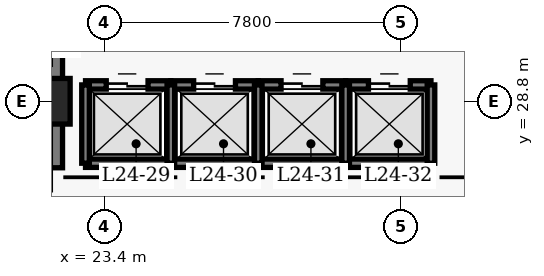
"""IFC4 building model, lengths in metres.
Left out: names, types, materials, properties, quantities, classifications, styles, units other than length and angle.
Written with IfcOpenShell. Run it as: python <this file> out.ifc"""

import sys

from ifc_helpers import new_model, si_unit, direction, frame, frame_2d, origin, origin_2d, place, context, subcontext, project, spatial, rectangle, extrude, element, fill, save


model = new_model("IFC4")
c1 = context("Model", 3, precision=1e-05, world=origin(), true_north=direction((0.0, 1.0)))
c2 = subcontext(c1, "Body", "Model", "MODEL_VIEW")
j1 = project(units=[si_unit("LENGTHUNIT", "METRE"), si_unit("PLANEANGLEUNIT", "RADIAN")], contexts=[c1])
p1 = place(None, origin())
s1 = spatial("IfcSite", under=j1, at=p1, CompositionType="ELEMENT")
p2 = place(p1, origin())
s2 = spatial("IfcBuilding", under=s1, at=p2, CompositionType="ELEMENT")
p3 = place(p2, frame((0.0, 0.0, 99.4)))
s3 = spatial("IfcBuildingStorey", under=s2, at=p3, CompositionType="ELEMENT", Elevation=99.4)
p4 = place(p3, frame((21.9, 27.05, 0.0), z_axis=(0.0, 0.0, 1.0), x_axis=(0.0, 1.0, 0.0)))
e1 = element("IfcWall", 1, at=p4, inside=s3, PredefinedType="SHEAR", context=c2, shape_type="SweptSolid", body=[
    extrude(rectangle(XDim=13.67, YDim=0.8, at=frame_2d((6.835, 0.0))), origin(), (0.0, 0.0, 1.0), 3.8),
])
p5 = place(p3, frame((21.9, 28.8, 0.0), z_axis=(0.0, 0.0, 1.0), x_axis=(1.0, 0.0, 0.0)))
e2 = element("IfcColumn", 2, at=p5, inside=s3, PredefinedType="COLUMN", context=c2, shape_type="SweptSolid", body=[
    extrude(rectangle(XDim=1.2, YDim=1.2, at=origin_2d()), origin(), (0.0, 0.0, 1.0), 3.8),
])
p6 = place(p3, frame((22.905, 29.23, 0.0), z_axis=(0.0, 0.0, 1.0), x_axis=(1.0, 0.0, 0.0)))
e3 = element("IfcWall", 3, at=p6, inside=s3, PredefinedType="SHEAR", context=c2, shape_type="SweptSolid", body=[
    extrude(rectangle(XDim=2.245, YDim=0.22, at=frame_2d((1.123, 0.0))), origin(), (0.0, 0.0, 1.0), 3.8),
])
p7 = place(p6, frame((0.545, 0.0, 0.0)))
e4 = element("IfcOpeningElement", 4, at=p7, cuts=e3, PredefinedType="OPENING", context=c2, shape_type="SweptSolid", body=[
    extrude(rectangle(XDim=1.1, YDim=2.15, at=frame_2d((0.55, 1.075))), frame((0.0, 0.12, 0.0), z_axis=(0.0, -1.0, 0.0), x_axis=(1.0, 0.0, 0.0)), (0.0, 0.0, 1.0), 0.24),
])
p8 = place(p3, frame((22.905, 27.17, 0.0), z_axis=(0.0, 0.0, 1.0), x_axis=(1.0, 0.0, 0.0)))
e5 = element("IfcWall", 5, at=p8, inside=s3, PredefinedType="SHEAR", context=c2, shape_type="SweptSolid", body=[
    extrude(rectangle(XDim=2.245, YDim=0.22, at=frame_2d((1.123, 0.0))), origin(), (0.0, 0.0, 1.0), 3.8),
])
p9 = place(p3, frame((22.905, 27.17, 0.0), z_axis=(0.0, 0.0, 1.0), x_axis=(0.0, 1.0, 0.0)))
e6 = element("IfcWall", 6, at=p9, inside=s3, PredefinedType="SHEAR", context=c2, shape_type="SweptSolid", body=[
    extrude(rectangle(XDim=2.06, YDim=0.2, at=frame_2d((1.03, 0.0))), origin(), (0.0, 0.0, 1.0), 3.8),
])
p10 = place(p3, frame((25.15, 29.23, 0.0), z_axis=(0.0, 0.0, 1.0), x_axis=(1.0, 0.0, 0.0)))
e7 = element("IfcWall", 7, at=p10, inside=s3, PredefinedType="SHEAR", context=c2, shape_type="SweptSolid", body=[
    extrude(rectangle(XDim=2.3, YDim=0.22, at=frame_2d((1.15, 0.0))), origin(), (0.0, 0.0, 1.0), 3.8),
])
p11 = place(p10, frame((0.6, 0.0, 0.0)))
e8 = element("IfcOpeningElement", 8, at=p11, cuts=e7, PredefinedType="OPENING", context=c2, shape_type="SweptSolid", body=[
    extrude(rectangle(XDim=1.1, YDim=2.15, at=frame_2d((0.55, 1.075))), frame((0.0, 0.12, 0.0), z_axis=(0.0, -1.0, 0.0), x_axis=(1.0, 0.0, 0.0)), (0.0, 0.0, 1.0), 0.24),
])
p12 = place(p3, frame((25.15, 27.17, 0.0), z_axis=(0.0, 0.0, 1.0), x_axis=(1.0, 0.0, 0.0)))
e9 = element("IfcWall", 9, at=p12, inside=s3, PredefinedType="SHEAR", context=c2, shape_type="SweptSolid", body=[
    extrude(rectangle(XDim=2.3, YDim=0.22, at=frame_2d((1.15, 0.0))), origin(), (0.0, 0.0, 1.0), 3.8),
])
p13 = place(p3, frame((25.15, 27.17, 0.0), z_axis=(0.0, 0.0, 1.0), x_axis=(0.0, 1.0, 0.0)))
e10 = element("IfcWall", 10, at=p13, inside=s3, PredefinedType="SHEAR", context=c2, shape_type="SweptSolid", body=[
    extrude(rectangle(XDim=2.06, YDim=0.2, at=frame_2d((1.03, 0.0))), origin(), (0.0, 0.0, 1.0), 3.8),
])
p14 = place(p3, frame((27.45, 29.23, 0.0), z_axis=(0.0, 0.0, 1.0), x_axis=(1.0, 0.0, 0.0)))
e11 = element("IfcWall", 11, at=p14, inside=s3, PredefinedType="SHEAR", context=c2, shape_type="SweptSolid", body=[
    extrude(rectangle(XDim=2.3, YDim=0.22, at=frame_2d((1.15, 0.0))), origin(), (0.0, 0.0, 1.0), 3.8),
])
p15 = place(p14, frame((0.6, 0.0, 0.0)))
e12 = element("IfcOpeningElement", 12, at=p15, cuts=e11, PredefinedType="OPENING", context=c2, shape_type="SweptSolid", body=[
    extrude(rectangle(XDim=1.1, YDim=2.15, at=frame_2d((0.55, 1.075))), frame((0.0, 0.12, 0.0), z_axis=(0.0, -1.0, 0.0), x_axis=(1.0, 0.0, 0.0)), (0.0, 0.0, 1.0), 0.24),
])
p16 = place(p3, frame((27.45, 27.17, 0.0), z_axis=(0.0, 0.0, 1.0), x_axis=(1.0, 0.0, 0.0)))
e13 = element("IfcWall", 13, at=p16, inside=s3, PredefinedType="SHEAR", context=c2, shape_type="SweptSolid", body=[
    extrude(rectangle(XDim=2.3, YDim=0.22, at=frame_2d((1.15, 0.0))), origin(), (0.0, 0.0, 1.0), 3.8),
])
p17 = place(p3, frame((27.45, 27.17, 0.0), z_axis=(0.0, 0.0, 1.0), x_axis=(0.0, 1.0, 0.0)))
e14 = element("IfcWall", 14, at=p17, inside=s3, PredefinedType="SHEAR", context=c2, shape_type="SweptSolid", body=[
    extrude(rectangle(XDim=2.06, YDim=0.2, at=frame_2d((1.03, 0.0))), origin(), (0.0, 0.0, 1.0), 3.8),
])
p18 = place(p3, frame((29.75, 29.23, 0.0), z_axis=(0.0, 0.0, 1.0), x_axis=(1.0, 0.0, 0.0)))
e15 = element("IfcWall", 15, at=p18, inside=s3, PredefinedType="SHEAR", context=c2, shape_type="SweptSolid", body=[
    extrude(rectangle(XDim=2.245, YDim=0.22, at=frame_2d((1.123, 0.0))), origin(), (0.0, 0.0, 1.0), 3.8),
])
p19 = place(p18, frame((0.6, 0.0, 0.0)))
e16 = element("IfcOpeningElement", 16, at=p19, cuts=e15, PredefinedType="OPENING", context=c2, shape_type="SweptSolid", body=[
    extrude(rectangle(XDim=1.1, YDim=2.15, at=frame_2d((0.55, 1.075))), frame((0.0, 0.12, 0.0), z_axis=(0.0, -1.0, 0.0), x_axis=(1.0, 0.0, 0.0)), (0.0, 0.0, 1.0), 0.24),
])
p20 = place(p3, frame((29.75, 27.17, 0.0), z_axis=(0.0, 0.0, 1.0), x_axis=(1.0, 0.0, 0.0)))
e17 = element("IfcWall", 17, at=p20, inside=s3, PredefinedType="SHEAR", context=c2, shape_type="SweptSolid", body=[
    extrude(rectangle(XDim=2.245, YDim=0.22, at=frame_2d((1.123, 0.0))), origin(), (0.0, 0.0, 1.0), 3.8),
])
for number, where, z_axis, x_axis in (
    (18, (29.75, 27.17, 0.0), (0.0, 0.0, 1.0), (0.0, 1.0, 0.0)),
    (19, (31.995, 27.17, 0.0), (0.0, 0.0, 1.0), (0.0, 1.0, 0.0)),
):
    element("IfcWall", number, at=place(p3, frame(where, z_axis=z_axis, x_axis=x_axis)), inside=s3, PredefinedType="SHEAR", context=c2, shape_type="SweptSolid", body=[
        extrude(rectangle(XDim=2.06, YDim=0.2, at=frame_2d((1.03, 0.0))), origin(), (0.0, 0.0, 1.0), 3.8),
    ])
p21 = place(p7, origin())
e20 = element("IfcDoor", 20, at=p21, inside=s3, OperationType="DOUBLE_DOOR_SLIDING", PredefinedType="DOOR", context=c2, shape_type="SweptSolid", body=[
    extrude(rectangle(XDim=1.1, YDim=2.15, at=frame_2d((0.55, 1.075))), frame((0.0, 0.025, 0.0), z_axis=(0.0, -1.0, 0.0), x_axis=(1.0, 0.0, 0.0)), (0.0, 0.0, 1.0), 0.05),
])
fill(e4, e20)
p22 = place(p11, origin())
e21 = element("IfcDoor", 21, at=p22, inside=s3, OperationType="DOUBLE_DOOR_SLIDING", PredefinedType="DOOR", context=c2, shape_type="SweptSolid", body=[
    extrude(rectangle(XDim=1.1, YDim=2.15, at=frame_2d((0.55, 1.075))), frame((0.0, 0.025, 0.0), z_axis=(0.0, -1.0, 0.0), x_axis=(1.0, 0.0, 0.0)), (0.0, 0.0, 1.0), 0.05),
])
fill(e8, e21)
p23 = place(p15, origin())
e22 = element("IfcDoor", 22, at=p23, inside=s3, OperationType="DOUBLE_DOOR_SLIDING", PredefinedType="DOOR", context=c2, shape_type="SweptSolid", body=[
    extrude(rectangle(XDim=1.1, YDim=2.15, at=frame_2d((0.55, 1.075))), frame((0.0, 0.025, 0.0), z_axis=(0.0, -1.0, 0.0), x_axis=(1.0, 0.0, 0.0)), (0.0, 0.0, 1.0), 0.05),
])
fill(e12, e22)
p24 = place(p19, origin())
e23 = element("IfcDoor", 23, at=p24, inside=s3, OperationType="DOUBLE_DOOR_SLIDING", PredefinedType="DOOR", context=c2, shape_type="SweptSolid", body=[
    extrude(rectangle(XDim=1.1, YDim=2.15, at=frame_2d((0.55, 1.075))), frame((0.0, 0.025, 0.0), z_axis=(0.0, -1.0, 0.0), x_axis=(1.0, 0.0, 0.0)), (0.0, 0.0, 1.0), 0.05),
])
fill(e16, e23)
save(model, sys.argv[1])
